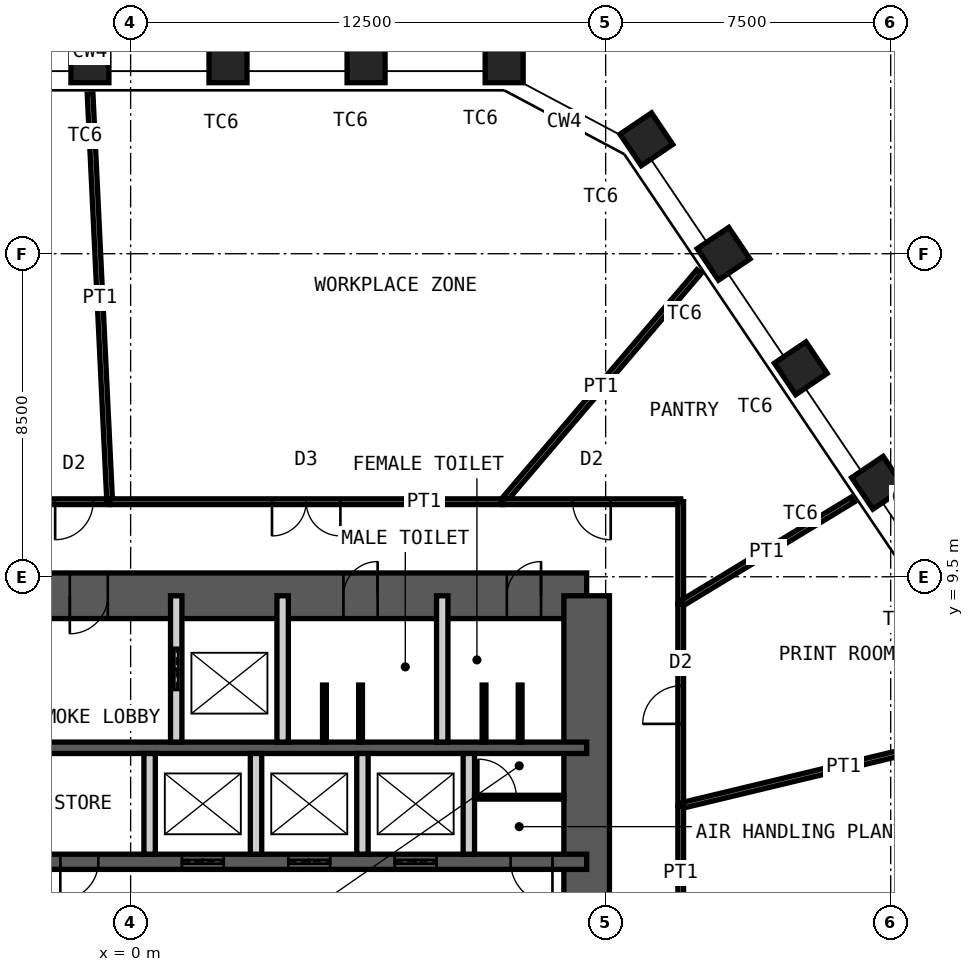
"""IFC4 building model, lengths in metres.
Left out: names, types, materials, properties, quantities, classifications, styles, units other than length and angle.
Written with IfcOpenShell. Run it as: python <this file> out.ifc"""

import sys

from ifc_helpers import new_model, si_unit, direction, frame, frame_2d, origin, origin_2d, place, context, subcontext, project, spatial, rectangle, hollow_rectangle, extrude, element, fill, save


model = new_model("IFC4")
c1 = context("Model", 3, precision=1e-05, world=origin(), true_north=direction((0.0, 1.0)))
c2 = subcontext(c1, "Body", "Model", "MODEL_VIEW")
j1 = project(units=[si_unit("LENGTHUNIT", "METRE"), si_unit("PLANEANGLEUNIT", "RADIAN")], contexts=[c1])
p1 = place(None, origin())
s1 = spatial("IfcSite", under=j1, at=p1, CompositionType="ELEMENT")
p2 = place(p1, origin())
s2 = spatial("IfcBuilding", under=s1, at=p2, CompositionType="ELEMENT")
p3 = place(p2, frame((0.0, 0.0, 239.2)))
s3 = spatial("IfcBuildingStorey", under=s2, at=p3, CompositionType="ELEMENT", Elevation=239.2)
for number, where, z_axis, x_axis in (
    (1, (-1.071, 23.0, 0.0), (0.0, 0.0, 1.0), (-1.0, 0.0, 0.0)),
    (2, (2.562, 23.0, 0.0), (0.0, 0.0, 1.0), (-1.0, 0.0, 0.0)),
    (3, (6.196, 23.0, 0.0), (0.0, 0.0, 1.0), (-1.0, 0.0, 0.0)),
    (4, (9.829, 23.0, 0.0), (0.0, 0.0, 1.0), (-1.0, 0.0, 0.0)),
    (5, (13.571, 21.01, 0.0), (0.0, 0.0, 1.0), (-0.559, 0.829, 0.0)),
    (6, (15.603, 17.998, 0.0), (0.0, 0.0, 1.0), (-0.559, 0.829, 0.0)),
    (7, (17.635, 14.986, 0.0), (0.0, 0.0, 1.0), (-0.559, 0.829, 0.0)),
    (8, (19.667, 11.973, 0.0), (0.0, 0.0, 1.0), (-0.559, 0.829, 0.0)),
):
    element("IfcColumn", number, at=place(p3, frame(where, z_axis=z_axis, x_axis=x_axis)), inside=s3, PredefinedType="COLUMN", context=c2, shape_type="SweptSolid", body=[
        extrude(hollow_rectangle(XDim=1.0, YDim=1.0, WallThickness=0.06, at=origin_2d()), origin(), (0.0, 0.0, 1.0), 4.2),
    ])
p4 = place(p3, frame((-12.0, 9.0, 0.0), z_axis=(0.0, 0.0, 1.0), x_axis=(1.0, 0.0, 0.0)))
e9 = element("IfcWall", 9, at=p4, inside=s3, PredefinedType="SHEAR", context=c2, shape_type="SweptSolid", body=[
    extrude(rectangle(XDim=24.0, YDim=1.2, at=frame_2d((12.0, 0.0))), origin(), (0.0, 0.0, 1.0), 4.2),
])
p5 = place(p4, frame((10.4, 0.0, 0.0)))
e10 = element("IfcOpeningElement", 10, at=p5, cuts=e9, PredefinedType="OPENING", context=c2, shape_type="SweptSolid", body=[
    extrude(rectangle(XDim=1.0, YDim=2.1, at=frame_2d((0.5, 1.05))), frame((0.0, 0.61, 0.0), z_axis=(0.0, -1.0, 0.0), x_axis=(1.0, 0.0, 0.0)), (0.0, 0.0, 1.0), 1.22),
])
p6 = place(p4, frame((17.6, 0.0, 0.0)))
e11 = element("IfcOpeningElement", 11, at=p6, cuts=e9, PredefinedType="OPENING", context=c2, shape_type="SweptSolid", body=[
    extrude(rectangle(XDim=0.9, YDim=2.1, at=frame_2d((0.45, 1.05))), frame((0.0, 0.61, 0.0), z_axis=(0.0, -1.0, 0.0), x_axis=(1.0, 0.0, 0.0)), (0.0, 0.0, 1.0), 1.22),
])
p7 = place(p4, frame((21.9, 0.0, 0.0)))
e12 = element("IfcOpeningElement", 12, at=p7, cuts=e9, PredefinedType="OPENING", context=c2, shape_type="SweptSolid", body=[
    extrude(rectangle(XDim=0.9, YDim=2.1, at=frame_2d((0.45, 1.05))), frame((0.0, 0.61, 0.0), z_axis=(0.0, -1.0, 0.0), x_axis=(1.0, 0.0, 0.0)), (0.0, 0.0, 1.0), 1.22),
])
p8 = place(p3, frame((12.0, -9.0, 0.0), z_axis=(0.0, 0.0, 1.0), x_axis=(0.0, 1.0, 0.0)))
e13 = element("IfcWall", 13, at=p8, inside=s3, PredefinedType="SHEAR", context=c2, shape_type="SweptSolid", body=[
    extrude(rectangle(XDim=18.0, YDim=1.2, at=frame_2d((9.0, 0.0))), origin(), (0.0, 0.0, 1.0), 4.2),
])
p9 = place(p8, frame((8.1, 0.0, 0.0)))
e14 = element("IfcOpeningElement", 14, at=p9, cuts=e13, PredefinedType="OPENING", context=c2, shape_type="SweptSolid", body=[
    extrude(rectangle(XDim=1.8, YDim=2.1, at=frame_2d((0.9, 1.05))), frame((0.0, 0.61, 0.0), z_axis=(0.0, -1.0, 0.0), x_axis=(1.0, 0.0, 0.0)), (0.0, 0.0, 1.0), 1.22),
])
p10 = place(p3, frame((-12.0, 5.0, 0.0), z_axis=(0.0, 0.0, 1.0), x_axis=(1.0, 0.0, 0.0)))
e15 = element("IfcWall", 15, at=p10, inside=s3, PredefinedType="SHEAR", context=c2, shape_type="SweptSolid", body=[
    extrude(rectangle(XDim=24.0, YDim=0.3, at=frame_2d((12.0, 0.0))), origin(), (0.0, 0.0, 1.0), 4.2),
])
p11 = place(p3, frame((-12.0, 2.0, 0.0), z_axis=(0.0, 0.0, 1.0), x_axis=(1.0, 0.0, 0.0)))
e16 = element("IfcWall", 16, at=p11, inside=s3, PredefinedType="SHEAR", context=c2, shape_type="SweptSolid", body=[
    extrude(rectangle(XDim=24.0, YDim=0.4, at=frame_2d((12.0, 0.0))), origin(), (0.0, 0.0, 1.0), 4.2),
])
p12 = place(p11, frame((2.4, 0.0, 0.0)))
e17 = element("IfcOpeningElement", 17, at=p12, cuts=e16, PredefinedType="OPENING", context=c2, shape_type="SweptSolid", body=[
    extrude(rectangle(XDim=1.1, YDim=2.1, at=frame_2d((0.55, 1.05))), frame((0.0, 0.21, 0.0), z_axis=(0.0, -1.0, 0.0), x_axis=(1.0, 0.0, 0.0)), (0.0, 0.0, 1.0), 0.42),
])
p13 = place(p11, frame((22.0, 0.0, 0.0)))
e18 = element("IfcOpeningElement", 18, at=p13, cuts=e16, PredefinedType="OPENING", context=c2, shape_type="SweptSolid", body=[
    extrude(rectangle(XDim=1.1, YDim=2.1, at=frame_2d((0.55, 1.05))), frame((0.0, 0.21, 0.0), z_axis=(0.0, -1.0, 0.0), x_axis=(1.0, 0.0, 0.0)), (0.0, 0.0, 1.0), 0.42),
])
p14 = place(p11, frame((10.15, 0.0, 0.0)))
e19 = element("IfcOpeningElement", 19, at=p14, cuts=e16, PredefinedType="OPENING", context=c2, shape_type="SweptSolid", body=[
    extrude(rectangle(XDim=1.0, YDim=2.1, at=frame_2d((0.5, 1.05))), frame((0.0, 0.21, 0.0), z_axis=(0.0, -1.0, 0.0), x_axis=(1.0, 0.0, 0.0)), (0.0, 0.0, 1.0), 0.42),
])
p15 = place(p11, frame((6.9, 0.0, 0.0)))
e20 = element("IfcOpeningElement", 20, at=p15, cuts=e16, PredefinedType="OPENING", context=c2, shape_type="SweptSolid", body=[
    extrude(rectangle(XDim=1.0, YDim=2.1, at=frame_2d((0.5, 1.05))), frame((0.0, 0.21, 0.0), z_axis=(0.0, -1.0, 0.0), x_axis=(1.0, 0.0, 0.0)), (0.0, 0.0, 1.0), 0.42),
])
p16 = place(p11, frame((13.35, 0.0, 0.0)))
e21 = element("IfcOpeningElement", 21, at=p16, cuts=e16, PredefinedType="OPENING", context=c2, shape_type="SweptSolid", body=[
    extrude(rectangle(XDim=1.1, YDim=2.4, at=frame_2d((0.55, 1.2))), frame((0.0, 0.21, 0.0), z_axis=(0.0, -1.0, 0.0), x_axis=(1.0, 0.0, 0.0)), (0.0, 0.0, 1.0), 0.42),
])
p17 = place(p11, frame((16.15, 0.0, 0.0)))
e22 = element("IfcOpeningElement", 22, at=p17, cuts=e16, PredefinedType="OPENING", context=c2, shape_type="SweptSolid", body=[
    extrude(rectangle(XDim=1.1, YDim=2.4, at=frame_2d((0.55, 1.2))), frame((0.0, 0.21, 0.0), z_axis=(0.0, -1.0, 0.0), x_axis=(1.0, 0.0, 0.0)), (0.0, 0.0, 1.0), 0.42),
])
p18 = place(p11, frame((18.95, 0.0, 0.0)))
e23 = element("IfcOpeningElement", 23, at=p18, cuts=e16, PredefinedType="OPENING", context=c2, shape_type="SweptSolid", body=[
    extrude(rectangle(XDim=1.1, YDim=2.4, at=frame_2d((0.55, 1.2))), frame((0.0, 0.21, 0.0), z_axis=(0.0, -1.0, 0.0), x_axis=(1.0, 0.0, 0.0)), (0.0, 0.0, 1.0), 0.42),
])
p19 = place(p3, frame((1.2, 5.15, 0.0), z_axis=(0.0, 0.0, 1.0), x_axis=(0.0, 1.0, 0.0)))
e24 = element("IfcWall", 24, at=p19, inside=s3, PredefinedType="PARTITIONING", context=c2, shape_type="SweptSolid", body=[
    extrude(rectangle(XDim=3.85, YDim=0.3, at=frame_2d((1.925, 0.0))), origin(), (0.0, 0.0, 1.0), 3.98),
])
p20 = place(p19, frame((1.375, 0.0, 0.0)))
e25 = element("IfcOpeningElement", 25, at=p20, cuts=e24, PredefinedType="OPENING", context=c2, shape_type="SweptSolid", body=[
    extrude(rectangle(XDim=1.1, YDim=2.4, at=frame_2d((0.55, 1.2))), frame((0.0, 0.16, 0.0), z_axis=(0.0, -1.0, 0.0), x_axis=(1.0, 0.0, 0.0)), (0.0, 0.0, 1.0), 0.32),
])
for number, where, z_axis, x_axis in (
    (26, (4.0, 5.15, 0.0), (0.0, 0.0, 1.0), (0.0, 1.0, 0.0)),
    (27, (8.2, 5.15, 0.0), (0.0, 0.0, 1.0), (0.0, 1.0, 0.0)),
):
    element("IfcWall", number, at=place(p3, frame(where, z_axis=z_axis, x_axis=x_axis)), inside=s3, PredefinedType="PARTITIONING", context=c2, shape_type="SweptSolid", body=[
        extrude(rectangle(XDim=3.85, YDim=0.3, at=frame_2d((1.925, 0.0))), origin(), (0.0, 0.0, 1.0), 3.98),
    ])
for number, where, z_axis, x_axis in (
    (28, (0.5, 2.2, 0.0), (0.0, 0.0, 1.0), (0.0, 1.0, 0.0)),
    (29, (3.3, 2.2, 0.0), (0.0, 0.0, 1.0), (0.0, 1.0, 0.0)),
    (30, (6.1, 2.2, 0.0), (0.0, 0.0, 1.0), (0.0, 1.0, 0.0)),
    (31, (8.9, 2.2, 0.0), (0.0, 0.0, 1.0), (0.0, 1.0, 0.0)),
):
    element("IfcWall", number, at=place(p3, frame(where, z_axis=z_axis, x_axis=x_axis)), inside=s3, PredefinedType="PARTITIONING", context=c2, shape_type="SweptSolid", body=[
        extrude(rectangle(XDim=2.65, YDim=0.3, at=frame_2d((1.325, 0.0))), origin(), (0.0, 0.0, 1.0), 3.98),
    ])
p21 = place(p3, frame((9.05, 3.7, 0.0), z_axis=(0.0, 0.0, 1.0), x_axis=(1.0, 0.0, 0.0)))
e32 = element("IfcWall", 32, at=p21, inside=s3, PredefinedType="PARTITIONING", context=c2, shape_type="SweptSolid", body=[
    extrude(rectangle(XDim=2.35, YDim=0.1, at=frame_2d((1.175, 0.0))), origin(), (0.0, 0.0, 1.0), 3.98),
])
p22 = place(p21, frame((0.1, 0.0, 0.0)))
e33 = element("IfcOpeningElement", 33, at=p22, cuts=e32, PredefinedType="OPENING", context=c2, shape_type="SweptSolid", body=[
    extrude(rectangle(XDim=1.0, YDim=2.4, at=frame_2d((0.5, 1.2))), frame((0.0, 0.06, 0.0), z_axis=(0.0, -1.0, 0.0), x_axis=(1.0, 0.0, 0.0)), (0.0, 0.0, 1.0), 0.12),
])
for number, where, z_axis, x_axis in (
    (34, (5.1, 5.15, 0.0), (0.0, 0.0, 1.0), (0.0, 1.0, 0.0)),
    (35, (6.05, 5.15, 0.0), (0.0, 0.0, 1.0), (0.0, 1.0, 0.0)),
    (36, (9.3, 5.15, 0.0), (0.0, 0.0, 1.0), (0.0, 1.0, 0.0)),
    (37, (10.25, 5.15, 0.0), (0.0, 0.0, 1.0), (0.0, 1.0, 0.0)),
):
    element("IfcWall", number, at=place(p3, frame(where, z_axis=z_axis, x_axis=x_axis)), inside=s3, PredefinedType="PARTITIONING", context=c2, shape_type="SweptSolid", body=[
        extrude(rectangle(XDim=1.5, YDim=0.1, at=frame_2d((0.75, 0.0))), origin(), (0.0, 0.0, 1.0), 2.1),
    ])
p23 = place(p3, frame((-2.421, 11.475, 0.0), z_axis=(0.0, 0.0, 1.0), x_axis=(1.0, 0.0, 0.0)))
e38 = element("IfcWall", 38, at=p23, inside=s3, PredefinedType="PARTITIONING", context=c2, shape_type="SweptSolid", body=[
    extrude(rectangle(XDim=1.87, YDim=0.15, at=frame_2d((0.935, 0.0))), origin(), (0.0, 0.0, 1.0), 4.03),
])
p24 = place(p23, frame((0.435, 0.0, 0.0)))
e39 = element("IfcOpeningElement", 39, at=p24, cuts=e38, PredefinedType="OPENING", context=c2, shape_type="SweptSolid", body=[
    extrude(rectangle(XDim=1.0, YDim=2.4, at=frame_2d((0.5, 1.2))), frame((0.0, 0.085, 0.0), z_axis=(0.0, -1.0, 0.0), x_axis=(1.0, 0.0, 0.0)), (0.0, 0.0, 1.0), 0.17),
])
p25 = place(p3, frame((-1.067, 22.2, 0.0), z_axis=(0.0, 0.0, 1.0), x_axis=(0.047998335863, -0.998847415652, 0.0)))
e40 = element("IfcWall", 40, at=p25, inside=s3, PredefinedType="PARTITIONING", context=c2, shape_type="SweptSolid", body=[
    extrude(rectangle(XDim=10.738, YDim=0.15, at=frame_2d((5.369, 0.0))), origin(), (0.0, 0.0, 1.0), 3.43),
])
p26 = place(p3, frame((-0.551, 11.475, 0.0), z_axis=(0.0, 0.0, 1.0), x_axis=(1.0, 0.0, 0.0)))
e41 = element("IfcWall", 41, at=p26, inside=s3, PredefinedType="PARTITIONING", context=c2, shape_type="SweptSolid", body=[
    extrude(rectangle(XDim=10.342, YDim=0.15, at=frame_2d((5.171, 0.0))), origin(), (0.0, 0.0, 1.0), 4.03),
])
p27 = place(p26, frame((4.271, 0.0, 0.0)))
e42 = element("IfcOpeningElement", 42, at=p27, cuts=e41, PredefinedType="OPENING", context=c2, shape_type="SweptSolid", body=[
    extrude(rectangle(XDim=1.8, YDim=2.4, at=frame_2d((0.9, 1.2))), frame((0.0, 0.085, 0.0), z_axis=(0.0, -1.0, 0.0), x_axis=(1.0, 0.0, 0.0)), (0.0, 0.0, 1.0), 0.17),
])
p28 = place(p3, frame((14.958, 17.531, 0.0), z_axis=(0.0, 0.0, 1.0), x_axis=(-0.649097500837, -0.760705221756, 0.0)))
e43 = element("IfcWall", 43, at=p28, inside=s3, PredefinedType="PARTITIONING", context=c2, shape_type="SweptSolid", body=[
    extrude(rectangle(XDim=7.96, YDim=0.15, at=frame_2d((3.98, 0.0))), origin(), (0.0, 0.0, 1.0), 3.43),
])
p29 = place(p3, frame((9.791, 11.475, 0.0), z_axis=(0.0, 0.0, 1.0), x_axis=(1.0, 0.0, 0.0)))
e44 = element("IfcWall", 44, at=p29, inside=s3, PredefinedType="PARTITIONING", context=c2, shape_type="SweptSolid", body=[
    extrude(rectangle(XDim=4.684, YDim=0.15, at=frame_2d((2.342, 0.0))), origin(), (0.0, 0.0, 1.0), 4.03),
])
p30 = place(p29, frame((1.842, 0.0, 0.0)))
e45 = element("IfcOpeningElement", 45, at=p30, cuts=e44, PredefinedType="OPENING", context=c2, shape_type="SweptSolid", body=[
    extrude(rectangle(XDim=1.0, YDim=2.4, at=frame_2d((0.5, 1.2))), frame((0.0, 0.085, 0.0), z_axis=(0.0, -1.0, 0.0), x_axis=(1.0, 0.0, 0.0)), (0.0, 0.0, 1.0), 0.17),
])
p31 = place(p3, frame((14.475, 11.475, 0.0), z_axis=(0.0, 0.0, 1.0), x_axis=(0.0, -1.0, 0.0)))
e46 = element("IfcWall", 46, at=p31, inside=s3, PredefinedType="PARTITIONING", context=c2, shape_type="SweptSolid", body=[
    extrude(rectangle(XDim=2.692, YDim=0.15, at=frame_2d((1.346, 0.0))), origin(), (0.0, 0.0, 1.0), 4.03),
])
p32 = place(p3, frame((19.001, 11.53, 0.0), z_axis=(0.0, 0.0, 1.0), x_axis=(-0.854906581035, -0.518781975114, 0.0)))
e47 = element("IfcWall", 47, at=p32, inside=s3, PredefinedType="PARTITIONING", context=c2, shape_type="SweptSolid", body=[
    extrude(rectangle(XDim=5.294, YDim=0.15, at=frame_2d((2.647, 0.0))), origin(), (0.0, 0.0, 1.0), 3.43),
])
p33 = place(p3, frame((14.475, 8.783, 0.0), z_axis=(0.0, 0.0, 1.0), x_axis=(0.0, -1.0, 0.0)))
e48 = element("IfcWall", 48, at=p33, inside=s3, PredefinedType="PARTITIONING", context=c2, shape_type="SweptSolid", body=[
    extrude(rectangle(XDim=5.309, YDim=0.15, at=frame_2d((2.654, 0.0))), origin(), (0.0, 0.0, 1.0), 4.03),
])
p34 = place(p33, frame((2.154, 0.0, 0.0)))
e49 = element("IfcOpeningElement", 49, at=p34, cuts=e48, PredefinedType="OPENING", context=c2, shape_type="SweptSolid", body=[
    extrude(rectangle(XDim=1.0, YDim=2.4, at=frame_2d((0.5, 1.2))), frame((0.0, 0.085, 0.0), z_axis=(0.0, -1.0, 0.0), x_axis=(1.0, 0.0, 0.0)), (0.0, 0.0, 1.0), 0.17),
])
p35 = place(p3, frame((23.053, 5.534, 0.0), z_axis=(0.0, 0.0, 1.0), x_axis=(-0.972377252501, -0.233414821335, 0.0)))
e50 = element("IfcWall", 50, at=p35, inside=s3, PredefinedType="PARTITIONING", context=c2, shape_type="SweptSolid", body=[
    extrude(rectangle(XDim=8.822, YDim=0.15, at=frame_2d((4.411, 0.0))), origin(), (0.0, 0.0, 1.0), 3.43),
])
p36 = place(p3, frame((14.475, 3.475, 0.0), z_axis=(0.0, 0.0, 1.0), x_axis=(0.0, -1.0, 0.0)))
e51 = element("IfcWall", 51, at=p36, inside=s3, PredefinedType="PARTITIONING", context=c2, shape_type="SweptSolid", body=[
    extrude(rectangle(XDim=5.896, YDim=0.15, at=frame_2d((2.948, 0.0))), origin(), (0.0, 0.0, 1.0), 4.03),
])
p37 = place(p36, frame((2.448, 0.0, 0.0)))
e52 = element("IfcOpeningElement", 52, at=p37, cuts=e51, PredefinedType="OPENING", context=c2, shape_type="SweptSolid", body=[
    extrude(rectangle(XDim=1.0, YDim=2.4, at=frame_2d((0.5, 1.2))), frame((0.0, 0.085, 0.0), z_axis=(0.0, -1.0, 0.0), x_axis=(1.0, 0.0, 0.0)), (0.0, 0.0, 1.0), 0.17),
])
p38 = place(p5, origin())
e53 = element("IfcDoor", 53, at=p38, inside=s3, OperationType="SINGLE_SWING_LEFT", PredefinedType="DOOR", context=c2, shape_type="SweptSolid", body=[
    extrude(rectangle(XDim=1.0, YDim=2.1, at=frame_2d((0.5, 1.05))), frame((0.0, 0.025, 0.0), z_axis=(0.0, -1.0, 0.0), x_axis=(1.0, 0.0, 0.0)), (0.0, 0.0, 1.0), 0.05),
])
fill(e10, e53)
p39 = place(p6, origin())
e54 = element("IfcDoor", 54, at=p39, inside=s3, OperationType="SINGLE_SWING_LEFT", PredefinedType="DOOR", context=c2, shape_type="SweptSolid", body=[
    extrude(rectangle(XDim=0.9, YDim=2.1, at=frame_2d((0.45, 1.05))), frame((0.0, 0.025, 0.0), z_axis=(0.0, -1.0, 0.0), x_axis=(1.0, 0.0, 0.0)), (0.0, 0.0, 1.0), 0.05),
])
fill(e11, e54)
p40 = place(p7, origin())
e55 = element("IfcDoor", 55, at=p40, inside=s3, OperationType="SINGLE_SWING_LEFT", PredefinedType="DOOR", context=c2, shape_type="SweptSolid", body=[
    extrude(rectangle(XDim=0.9, YDim=2.1, at=frame_2d((0.45, 1.05))), frame((0.0, 0.025, 0.0), z_axis=(0.0, -1.0, 0.0), x_axis=(1.0, 0.0, 0.0)), (0.0, 0.0, 1.0), 0.05),
])
fill(e12, e55)
p41 = place(p13, origin())
e56 = element("IfcDoor", 56, at=p41, inside=s3, OperationType="SINGLE_SWING_RIGHT", PredefinedType="DOOR", context=c2, shape_type="SweptSolid", body=[
    extrude(rectangle(XDim=1.1, YDim=2.1, at=frame_2d((0.55, 1.05))), frame((0.0, 0.025, 0.0), z_axis=(0.0, -1.0, 0.0), x_axis=(1.0, 0.0, 0.0)), (0.0, 0.0, 1.0), 0.05),
])
fill(e18, e56)
p42 = place(p14, origin())
e57 = element("IfcDoor", 57, at=p42, inside=s3, OperationType="SINGLE_SWING_LEFT", PredefinedType="DOOR", context=c2, shape_type="SweptSolid", body=[
    extrude(rectangle(XDim=1.0, YDim=2.1, at=frame_2d((0.5, 1.05))), frame((0.0, 0.025, 0.0), z_axis=(0.0, -1.0, 0.0), x_axis=(1.0, 0.0, 0.0)), (0.0, 0.0, 1.0), 0.05),
])
fill(e19, e57)
p43 = place(p20, origin())
e58 = element("IfcDoor", 58, at=p43, inside=s3, OperationType="DOUBLE_DOOR_SLIDING", PredefinedType="DOOR", context=c2, shape_type="SweptSolid", body=[
    extrude(rectangle(XDim=1.1, YDim=2.4, at=frame_2d((0.55, 1.2))), frame((0.0, 0.025, 0.0), z_axis=(0.0, -1.0, 0.0), x_axis=(1.0, 0.0, 0.0)), (0.0, 0.0, 1.0), 0.05),
])
fill(e25, e58)
p44 = place(p16, origin())
e59 = element("IfcDoor", 59, at=p44, inside=s3, OperationType="DOUBLE_DOOR_SLIDING", PredefinedType="DOOR", context=c2, shape_type="SweptSolid", body=[
    extrude(rectangle(XDim=1.1, YDim=2.4, at=frame_2d((0.55, 1.2))), frame((0.0, 0.025, 0.0), z_axis=(0.0, -1.0, 0.0), x_axis=(1.0, 0.0, 0.0)), (0.0, 0.0, 1.0), 0.05),
])
fill(e21, e59)
p45 = place(p17, origin())
e60 = element("IfcDoor", 60, at=p45, inside=s3, OperationType="DOUBLE_DOOR_SLIDING", PredefinedType="DOOR", context=c2, shape_type="SweptSolid", body=[
    extrude(rectangle(XDim=1.1, YDim=2.4, at=frame_2d((0.55, 1.2))), frame((0.0, 0.025, 0.0), z_axis=(0.0, -1.0, 0.0), x_axis=(1.0, 0.0, 0.0)), (0.0, 0.0, 1.0), 0.05),
])
fill(e22, e60)
p46 = place(p18, origin())
e61 = element("IfcDoor", 61, at=p46, inside=s3, OperationType="DOUBLE_DOOR_SLIDING", PredefinedType="DOOR", context=c2, shape_type="SweptSolid", body=[
    extrude(rectangle(XDim=1.1, YDim=2.4, at=frame_2d((0.55, 1.2))), frame((0.0, 0.025, 0.0), z_axis=(0.0, -1.0, 0.0), x_axis=(1.0, 0.0, 0.0)), (0.0, 0.0, 1.0), 0.05),
])
fill(e23, e61)
p47 = place(p22, origin())
e62 = element("IfcDoor", 62, at=p47, inside=s3, OperationType="SINGLE_SWING_RIGHT", PredefinedType="DOOR", context=c2, shape_type="SweptSolid", body=[
    extrude(rectangle(XDim=1.0, YDim=2.4, at=frame_2d((0.5, 1.2))), frame((0.0, 0.025, 0.0), z_axis=(0.0, -1.0, 0.0), x_axis=(1.0, 0.0, 0.0)), (0.0, 0.0, 1.0), 0.05),
])
fill(e33, e62)
p48 = place(p24, origin())
e63 = element("IfcDoor", 63, at=p48, inside=s3, OperationType="SINGLE_SWING_LEFT", PredefinedType="DOOR", context=c2, shape_type="SweptSolid", body=[
    extrude(rectangle(XDim=1.0, YDim=2.4, at=frame_2d((0.5, 1.2))), frame((0.0, 0.025, 0.0), z_axis=(0.0, -1.0, 0.0), x_axis=(1.0, 0.0, 0.0)), (0.0, 0.0, 1.0), 0.05),
])
fill(e39, e63)
p49 = place(p27, origin())
e64 = element("IfcDoor", 64, at=p49, inside=s3, OperationType="DOUBLE_DOOR_DOUBLE_SWING", PredefinedType="DOOR", context=c2, shape_type="SweptSolid", body=[
    extrude(rectangle(XDim=1.8, YDim=2.4, at=frame_2d((0.9, 1.2))), frame((0.0, 0.025, 0.0), z_axis=(0.0, -1.0, 0.0), x_axis=(1.0, 0.0, 0.0)), (0.0, 0.0, 1.0), 0.05),
])
fill(e42, e64)
p50 = place(p30, origin())
e65 = element("IfcDoor", 65, at=p50, inside=s3, OperationType="SINGLE_SWING_RIGHT", PredefinedType="DOOR", context=c2, shape_type="SweptSolid", body=[
    extrude(rectangle(XDim=1.0, YDim=2.4, at=frame_2d((0.5, 1.2))), frame((0.0, 0.025, 0.0), z_axis=(0.0, -1.0, 0.0), x_axis=(1.0, 0.0, 0.0)), (0.0, 0.0, 1.0), 0.05),
])
fill(e45, e65)
p51 = place(p34, origin())
e66 = element("IfcDoor", 66, at=p51, inside=s3, OperationType="SINGLE_SWING_RIGHT", PredefinedType="DOOR", context=c2, shape_type="SweptSolid", body=[
    extrude(rectangle(XDim=1.0, YDim=2.4, at=frame_2d((0.5, 1.2))), frame((0.0, 0.025, 0.0), z_axis=(0.0, -1.0, 0.0), x_axis=(1.0, 0.0, 0.0)), (0.0, 0.0, 1.0), 0.05),
])
fill(e49, e66)
save(model, sys.argv[1])
